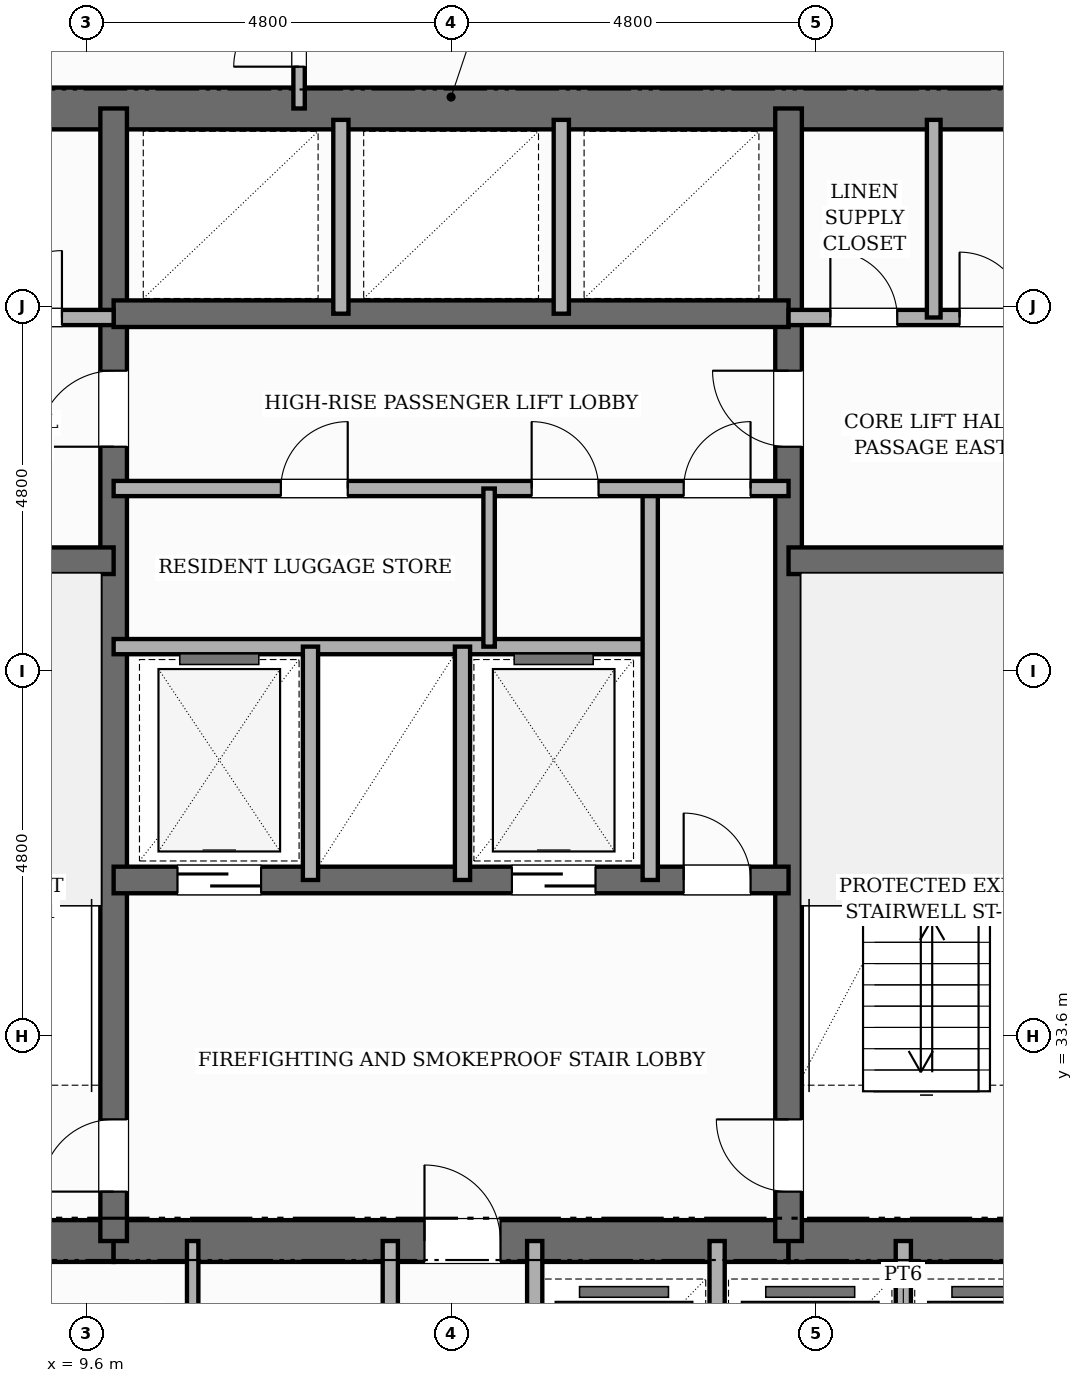
"""IFC4 building model, lengths in metres.
Left out: names, types, materials, properties, quantities, classifications, styles, units other than length and angle.
Written with IfcOpenShell. Run it as: python <this file> out.ifc"""

import sys

from ifc_helpers import new_model, si_unit, direction, frame, frame_2d, origin, place, context, subcontext, project, spatial, rectangle, extrude, element, fill, save


model = new_model("IFC4")
c1 = context("Model", 3, precision=1e-05, world=origin(), true_north=direction((0.0, 1.0)))
c2 = subcontext(c1, "Body", "Model", "MODEL_VIEW")
j1 = project(units=[si_unit("LENGTHUNIT", "METRE"), si_unit("PLANEANGLEUNIT", "RADIAN")], contexts=[c1])
p1 = place(None, origin())
s1 = spatial("IfcSite", under=j1, at=p1, CompositionType="ELEMENT")
p2 = place(p1, origin())
s2 = spatial("IfcBuilding", under=s1, at=p2, CompositionType="ELEMENT")
p3 = place(p2, frame((0.0, 0.0, 154.0)))
s3 = spatial("IfcBuildingStorey", under=s2, at=p3, CompositionType="ELEMENT", Elevation=154.0)
p4 = place(p3, frame((6.05, 45.8, 0.0), z_axis=(0.0, 0.0, 1.0), x_axis=(1.0, 0.0, 0.0)))
e1 = element("IfcWall", 1, at=p4, inside=s3, PredefinedType="SHEAR", context=c2, shape_type="SweptSolid", body=[
    extrude(rectangle(XDim=16.7, YDim=0.55, at=frame_2d((8.35, 0.0))), origin(), (0.0, 0.0, 1.0), 3.6),
])
p5 = place(p3, frame((6.05, 30.9, 0.0), z_axis=(0.0, 0.0, 1.0), x_axis=(1.0, 0.0, 0.0)))
e2 = element("IfcWall", 2, at=p5, inside=s3, PredefinedType="SHEAR", context=c2, shape_type="SweptSolid", body=[
    extrude(rectangle(XDim=3.91, YDim=0.55, at=frame_2d((1.955, 0.0))), origin(), (0.0, 0.0, 1.0), 3.6),
])
p6 = place(p3, frame((9.96, 30.9, 0.0), z_axis=(0.0, 0.0, 1.0), x_axis=(1.0, 0.0, 0.0)))
e3 = element("IfcWall", 3, at=p6, inside=s3, PredefinedType="SHEAR", context=c2, shape_type="SweptSolid", body=[
    extrude(rectangle(XDim=8.88, YDim=0.55, at=frame_2d((4.44, 0.0))), origin(), (0.0, 0.0, 1.0), 3.6),
])
p7 = place(p6, frame((4.09, 0.0, 0.0)))
e4 = element("IfcOpeningElement", 4, at=p7, cuts=e3, PredefinedType="OPENING", context=c2, shape_type="SweptSolid", body=[
    extrude(rectangle(XDim=1.0, YDim=2.15, at=frame_2d((0.5, 1.075))), frame((0.0, 0.285, 0.0), z_axis=(0.0, -1.0, 0.0), x_axis=(1.0, 0.0, 0.0)), (0.0, 0.0, 1.0), 0.57),
])
p8 = place(p3, frame((18.84, 30.9, 0.0), z_axis=(0.0, 0.0, 1.0), x_axis=(1.0, 0.0, 0.0)))
e5 = element("IfcWall", 5, at=p8, inside=s3, PredefinedType="SHEAR", context=c2, shape_type="SweptSolid", body=[
    extrude(rectangle(XDim=3.91, YDim=0.55, at=frame_2d((1.955, 0.0))), origin(), (0.0, 0.0, 1.0), 3.6),
])
p9 = place(p3, frame((9.96, 30.9, 0.0), z_axis=(0.0, 0.0, 1.0), x_axis=(0.0, 1.0, 0.0)))
e6 = element("IfcWall", 6, at=p9, inside=s3, PredefinedType="SHEAR", context=c2, shape_type="SweptSolid", body=[
    extrude(rectangle(XDim=14.9, YDim=0.35, at=frame_2d((7.45, 0.0))), origin(), (0.0, 0.0, 1.0), 3.6),
])
p10 = place(p9, frame((0.65, 0.0, 0.0)))
e7 = element("IfcOpeningElement", 7, at=p10, cuts=e6, PredefinedType="OPENING", context=c2, shape_type="SweptSolid", body=[
    extrude(rectangle(XDim=0.95, YDim=2.1, at=frame_2d((0.475, 1.05))), frame((0.0, 0.185, 0.0), z_axis=(0.0, -1.0, 0.0), x_axis=(1.0, 0.0, 0.0)), (0.0, 0.0, 1.0), 0.37),
])
p11 = place(p9, frame((10.45, 0.0, 0.0)))
e8 = element("IfcOpeningElement", 8, at=p11, cuts=e6, PredefinedType="OPENING", context=c2, shape_type="SweptSolid", body=[
    extrude(rectangle(XDim=1.0, YDim=2.15, at=frame_2d((0.5, 1.075))), frame((0.0, 0.185, 0.0), z_axis=(0.0, -1.0, 0.0), x_axis=(1.0, 0.0, 0.0)), (0.0, 0.0, 1.0), 0.37),
])
p12 = place(p3, frame((18.84, 30.9, 0.0), z_axis=(0.0, 0.0, 1.0), x_axis=(0.0, 1.0, 0.0)))
e9 = element("IfcWall", 9, at=p12, inside=s3, PredefinedType="SHEAR", context=c2, shape_type="SweptSolid", body=[
    extrude(rectangle(XDim=14.9, YDim=0.35, at=frame_2d((7.45, 0.0))), origin(), (0.0, 0.0, 1.0), 3.6),
])
p13 = place(p12, frame((0.65, 0.0, 0.0)))
e10 = element("IfcOpeningElement", 10, at=p13, cuts=e9, PredefinedType="OPENING", context=c2, shape_type="SweptSolid", body=[
    extrude(rectangle(XDim=0.95, YDim=2.1, at=frame_2d((0.475, 1.05))), frame((0.0, 0.185, 0.0), z_axis=(0.0, -1.0, 0.0), x_axis=(1.0, 0.0, 0.0)), (0.0, 0.0, 1.0), 0.37),
])
p14 = place(p12, frame((10.45, 0.0, 0.0)))
e11 = element("IfcOpeningElement", 11, at=p14, cuts=e9, PredefinedType="OPENING", context=c2, shape_type="SweptSolid", body=[
    extrude(rectangle(XDim=1.0, YDim=2.15, at=frame_2d((0.5, 1.075))), frame((0.0, 0.185, 0.0), z_axis=(0.0, -1.0, 0.0), x_axis=(1.0, 0.0, 0.0)), (0.0, 0.0, 1.0), 0.37),
])
for number, where, z_axis, x_axis in (
    (12, (6.05, 39.85, 0.0), (0.0, 0.0, 1.0), (1.0, 0.0, 0.0)),
    (13, (18.84, 39.85, 0.0), (0.0, 0.0, 1.0), (1.0, 0.0, 0.0)),
):
    element("IfcWall", number, at=place(p3, frame(where, z_axis=z_axis, x_axis=x_axis)), inside=s3, PredefinedType="SHEAR", context=c2, shape_type="SweptSolid", body=[
        extrude(rectangle(XDim=3.91, YDim=0.35, at=frame_2d((1.955, 0.0))), origin(), (0.0, 0.0, 1.0), 3.6),
    ])
p15 = place(p3, frame((9.96, 35.65, 0.0), z_axis=(0.0, 0.0, 1.0), x_axis=(1.0, 0.0, 0.0)))
e14 = element("IfcWall", 14, at=p15, inside=s3, PredefinedType="SHEAR", context=c2, shape_type="SweptSolid", body=[
    extrude(rectangle(XDim=8.88, YDim=0.35, at=frame_2d((4.44, 0.0))), origin(), (0.0, 0.0, 1.0), 3.6),
])
p16 = place(p15, frame((0.84, 0.0, 0.0)))
e15 = element("IfcOpeningElement", 15, at=p16, cuts=e14, PredefinedType="OPENING", context=c2, shape_type="SweptSolid", body=[
    extrude(rectangle(XDim=1.1, YDim=2.15, at=frame_2d((0.55, 1.075))), frame((0.0, 0.185, 0.0), z_axis=(0.0, -1.0, 0.0), x_axis=(1.0, 0.0, 0.0)), (0.0, 0.0, 1.0), 0.37),
])
p17 = place(p15, frame((5.24, 0.0, 0.0)))
e16 = element("IfcOpeningElement", 16, at=p17, cuts=e14, PredefinedType="OPENING", context=c2, shape_type="SweptSolid", body=[
    extrude(rectangle(XDim=1.1, YDim=2.15, at=frame_2d((0.55, 1.075))), frame((0.0, 0.185, 0.0), z_axis=(0.0, -1.0, 0.0), x_axis=(1.0, 0.0, 0.0)), (0.0, 0.0, 1.0), 0.37),
])
p18 = place(p15, frame((7.5, 0.0, 0.0)))
e17 = element("IfcOpeningElement", 17, at=p18, cuts=e14, PredefinedType="OPENING", context=c2, shape_type="SweptSolid", body=[
    extrude(rectangle(XDim=0.88, YDim=2.1, at=frame_2d((0.44, 1.05))), frame((0.0, 0.185, 0.0), z_axis=(0.0, -1.0, 0.0), x_axis=(1.0, 0.0, 0.0)), (0.0, 0.0, 1.0), 0.37),
])
p19 = place(p3, frame((9.96, 43.1, 0.0), z_axis=(0.0, 0.0, 1.0), x_axis=(1.0, 0.0, 0.0)))
e18 = element("IfcWall", 18, at=p19, inside=s3, PredefinedType="SHEAR", context=c2, shape_type="SweptSolid", body=[
    extrude(rectangle(XDim=8.88, YDim=0.35, at=frame_2d((4.44, 0.0))), origin(), (0.0, 0.0, 1.0), 3.6),
])
p20 = place(p3, frame((9.96, 38.72, 0.0), z_axis=(0.0, 0.0, 1.0), x_axis=(1.0, 0.0, 0.0)))
e19 = element("IfcWall", 19, at=p20, inside=s3, PredefinedType="POLYGONAL", context=c2, shape_type="SweptSolid", body=[
    extrude(rectangle(XDim=7.06, YDim=0.2, at=frame_2d((3.53, 0.0))), origin(), (0.0, 0.0, 1.0), 3.36),
])
for number, where, z_axis, x_axis in (
    (20, (12.55, 35.65, 0.0), (0.0, 0.0, 1.0), (0.0, 1.0, 0.0)),
    (21, (14.55, 35.65, 0.0), (0.0, 0.0, 1.0), (0.0, 1.0, 0.0)),
):
    element("IfcWall", number, at=place(p3, frame(where, z_axis=z_axis, x_axis=x_axis)), inside=s3, PredefinedType="POLYGONAL", context=c2, shape_type="SweptSolid", body=[
        extrude(rectangle(XDim=3.07, YDim=0.2, at=frame_2d((1.535, 0.0))), origin(), (0.0, 0.0, 1.0), 3.36),
    ])
p21 = place(p3, frame((17.02, 35.65, 0.0), z_axis=(0.0, 0.0, 1.0), x_axis=(0.0, 1.0, 0.0)))
e22 = element("IfcWall", 22, at=p21, inside=s3, PredefinedType="POLYGONAL", context=c2, shape_type="SweptSolid", body=[
    extrude(rectangle(XDim=5.15, YDim=0.2, at=frame_2d((2.575, 0.0))), origin(), (0.0, 0.0, 1.0), 3.36),
])
p22 = place(p3, frame((9.96, 40.8, 0.0), z_axis=(0.0, 0.0, 1.0), x_axis=(1.0, 0.0, 0.0)))
e23 = element("IfcWall", 23, at=p22, inside=s3, PredefinedType="POLYGONAL", context=c2, shape_type="SweptSolid", body=[
    extrude(rectangle(XDim=8.88, YDim=0.2, at=frame_2d((4.44, 0.0))), origin(), (0.0, 0.0, 1.0), 3.36),
])
p23 = place(p22, frame((7.5, 0.0, 0.0)))
e24 = element("IfcOpeningElement", 24, at=p23, cuts=e23, PredefinedType="OPENING", context=c2, shape_type="SweptSolid", body=[
    extrude(rectangle(XDim=0.88, YDim=2.1, at=frame_2d((0.44, 1.05))), frame((0.0, 0.11, 0.0), z_axis=(0.0, -1.0, 0.0), x_axis=(1.0, 0.0, 0.0)), (0.0, 0.0, 1.0), 0.22),
])
p24 = place(p22, frame((2.2, 0.0, 0.0)))
e25 = element("IfcOpeningElement", 25, at=p24, cuts=e23, PredefinedType="OPENING", context=c2, shape_type="SweptSolid", body=[
    extrude(rectangle(XDim=0.88, YDim=2.1, at=frame_2d((0.44, 1.05))), frame((0.0, 0.11, 0.0), z_axis=(0.0, -1.0, 0.0), x_axis=(1.0, 0.0, 0.0)), (0.0, 0.0, 1.0), 0.22),
])
p25 = place(p22, frame((5.5, 0.0, 0.0)))
e26 = element("IfcOpeningElement", 26, at=p25, cuts=e23, PredefinedType="OPENING", context=c2, shape_type="SweptSolid", body=[
    extrude(rectangle(XDim=0.88, YDim=2.1, at=frame_2d((0.44, 1.05))), frame((0.0, 0.11, 0.0), z_axis=(0.0, -1.0, 0.0), x_axis=(1.0, 0.0, 0.0)), (0.0, 0.0, 1.0), 0.22),
])
p26 = place(p3, frame((18.84, 43.05, 0.0), z_axis=(0.0, 0.0, 1.0), x_axis=(1.0, 0.0, 0.0)))
e27 = element("IfcWall", 27, at=p26, inside=s3, PredefinedType="POLYGONAL", context=c2, shape_type="SweptSolid", body=[
    extrude(rectangle(XDim=3.91, YDim=0.2, at=frame_2d((1.955, 0.0))), origin(), (0.0, 0.0, 1.0), 2.54),
])
p27 = place(p26, frame((0.55, 0.0, 0.0)))
e28 = element("IfcOpeningElement", 28, at=p27, cuts=e27, PredefinedType="OPENING", context=c2, shape_type="SweptSolid", body=[
    extrude(rectangle(XDim=0.88, YDim=2.1, at=frame_2d((0.44, 1.05))), frame((0.0, 0.11, 0.0), z_axis=(0.0, -1.0, 0.0), x_axis=(1.0, 0.0, 0.0)), (0.0, 0.0, 1.0), 0.22),
])
p28 = place(p26, frame((2.25, 0.0, 0.0)))
e29 = element("IfcOpeningElement", 29, at=p28, cuts=e27, PredefinedType="OPENING", context=c2, shape_type="SweptSolid", body=[
    extrude(rectangle(XDim=0.86, YDim=2.1, at=frame_2d((0.43, 1.05))), frame((0.0, 0.11, 0.0), z_axis=(0.0, -1.0, 0.0), x_axis=(1.0, 0.0, 0.0)), (0.0, 0.0, 1.0), 0.22),
])
p29 = place(p3, frame((6.05, 43.05, 0.0), z_axis=(0.0, 0.0, 1.0), x_axis=(1.0, 0.0, 0.0)))
e30 = element("IfcWall", 30, at=p29, inside=s3, PredefinedType="POLYGONAL", context=c2, shape_type="SweptSolid", body=[
    extrude(rectangle(XDim=3.91, YDim=0.2, at=frame_2d((1.955, 0.0))), origin(), (0.0, 0.0, 1.0), 2.54),
])
p30 = place(p29, frame((0.5, 0.0, 0.0)))
e31 = element("IfcOpeningElement", 31, at=p30, cuts=e30, PredefinedType="OPENING", context=c2, shape_type="SweptSolid", body=[
    extrude(rectangle(XDim=0.88, YDim=2.1, at=frame_2d((0.44, 1.05))), frame((0.0, 0.11, 0.0), z_axis=(0.0, -1.0, 0.0), x_axis=(1.0, 0.0, 0.0)), (0.0, 0.0, 1.0), 0.22),
])
p31 = place(p29, frame((2.35, 0.0, 0.0)))
e32 = element("IfcOpeningElement", 32, at=p31, cuts=e30, PredefinedType="OPENING", context=c2, shape_type="SweptSolid", body=[
    extrude(rectangle(XDim=0.88, YDim=2.1, at=frame_2d((0.44, 1.05))), frame((0.0, 0.11, 0.0), z_axis=(0.0, -1.0, 0.0), x_axis=(1.0, 0.0, 0.0)), (0.0, 0.0, 1.0), 0.22),
])
for number, where, z_axis, x_axis in (
    (33, (12.95, 43.1, 0.0), (0.0, 0.0, 1.0), (0.0, 1.0, 0.0)),
    (34, (15.85, 43.1, 0.0), (0.0, 0.0, 1.0), (0.0, 1.0, 0.0)),
):
    element("IfcWall", number, at=place(p3, frame(where, z_axis=z_axis, x_axis=x_axis)), inside=s3, PredefinedType="POLYGONAL", context=c2, shape_type="SweptSolid", body=[
        extrude(rectangle(XDim=2.55, YDim=0.2, at=frame_2d((1.275, 0.0))), origin(), (0.0, 0.0, 1.0), 3.36),
    ])
p32 = place(p3, frame((14.9, 38.72, 0.0), z_axis=(0.0, 0.0, 1.0), x_axis=(0.0, 1.0, 0.0)))
e35 = element("IfcWall", 35, at=p32, inside=s3, PredefinedType="PARTITIONING", context=c2, shape_type="SweptSolid", body=[
    extrude(rectangle(XDim=2.08, YDim=0.15, at=frame_2d((1.04, 0.0))), origin(), (0.0, 0.0, 1.0), 3.36),
])
p33 = place(p3, frame((20.75, 43.05, 0.0), z_axis=(0.0, 0.0, 1.0), x_axis=(0.0, 1.0, 0.0)))
e36 = element("IfcWall", 36, at=p33, inside=s3, PredefinedType="PLUMBINGWALL", context=c2, shape_type="SweptSolid", body=[
    extrude(rectangle(XDim=2.6, YDim=0.18, at=frame_2d((1.3, 0.0))), origin(), (0.0, 0.0, 1.0), 3.36),
])
p34 = place(p3, frame((13.6, 25.75, 0.0), z_axis=(0.0, 0.0, 1.0), x_axis=(0.0, 1.0, 0.0)))
e37 = element("IfcWall", 37, at=p34, inside=s3, PredefinedType="POLYGONAL", context=c2, shape_type="SweptSolid", body=[
    extrude(rectangle(XDim=5.15, YDim=0.2, at=frame_2d((2.575, 0.0))), origin(), (0.0, 0.0, 1.0), 3.36),
])
p35 = place(p34, frame((0.7, 0.0, 0.0)))
e38 = element("IfcOpeningElement", 38, at=p35, cuts=e37, PredefinedType="OPENING", context=c2, shape_type="SweptSolid", body=[
    extrude(rectangle(XDim=1.0, YDim=2.15, at=frame_2d((0.5, 1.075))), frame((0.0, 0.11, 0.0), z_axis=(0.0, -1.0, 0.0), x_axis=(1.0, 0.0, 0.0)), (0.0, 0.0, 1.0), 0.22),
])
p36 = place(p3, frame((11.0, 25.75, 0.0), z_axis=(0.0, 0.0, 1.0), x_axis=(0.0, 1.0, 0.0)))
e39 = element("IfcWall", 39, at=p36, inside=s3, PredefinedType="PARTITIONING", context=c2, shape_type="SweptSolid", body=[
    extrude(rectangle(XDim=5.15, YDim=0.15, at=frame_2d((2.575, 0.0))), origin(), (0.0, 0.0, 1.0), 3.36),
])
p37 = place(p36, frame((1.2, 0.0, 0.0)))
e40 = element("IfcOpeningElement", 40, at=p37, cuts=e39, PredefinedType="OPENING", context=c2, shape_type="SweptSolid", body=[
    extrude(rectangle(XDim=0.95, YDim=2.15, at=frame_2d((0.475, 1.075))), frame((0.0, 0.085, 0.0), z_axis=(0.0, -1.0, 0.0), x_axis=(1.0, 0.0, 0.0)), (0.0, 0.0, 1.0), 0.17),
])
for number, where, z_axis, x_axis in (
    (41, (15.5, 28.0, 0.0), (0.0, 0.0, 1.0), (0.0, 1.0, 0.0)),
    (42, (17.9, 28.0, 0.0), (0.0, 0.0, 1.0), (0.0, 1.0, 0.0)),
    (43, (20.35, 28.0, 0.0), (0.0, 0.0, 1.0), (0.0, 1.0, 0.0)),
):
    element("IfcWall", number, at=place(p3, frame(where, z_axis=z_axis, x_axis=x_axis)), inside=s3, PredefinedType="POLYGONAL", context=c2, shape_type="SweptSolid", body=[
        extrude(rectangle(XDim=2.9, YDim=0.2, at=frame_2d((1.45, 0.0))), origin(), (0.0, 0.0, 1.0), 3.36),
    ])
p38 = place(p3, frame((12.4, 45.8, 0.0), z_axis=(0.0, 0.0, 1.0), x_axis=(0.0, 1.0, 0.0)))
e44 = element("IfcWall", 44, at=p38, inside=s3, PredefinedType="PARTITIONING", context=c2, shape_type="SweptSolid", body=[
    extrude(rectangle(XDim=1.88, YDim=0.15, at=frame_2d((0.94, 0.0))), origin(), (0.0, 0.0, 1.0), 3.36),
])
p39 = place(p38, frame((0.55, 0.0, 0.0)))
e45 = element("IfcOpeningElement", 45, at=p39, cuts=e44, PredefinedType="OPENING", context=c2, shape_type="SweptSolid", body=[
    extrude(rectangle(XDim=0.86, YDim=2.1, at=frame_2d((0.43, 1.05))), frame((0.0, 0.085, 0.0), z_axis=(0.0, -1.0, 0.0), x_axis=(1.0, 0.0, 0.0)), (0.0, 0.0, 1.0), 0.17),
])
p40 = place(p10, origin())
e46 = element("IfcDoor", 46, at=p40, inside=s3, OperationType="SINGLE_SWING_LEFT", PredefinedType="DOOR", context=c2, shape_type="SweptSolid", body=[
    extrude(rectangle(XDim=0.95, YDim=2.1, at=frame_2d((0.475, 1.05))), frame((0.0, 0.025, 0.0), z_axis=(0.0, -1.0, 0.0), x_axis=(1.0, 0.0, 0.0)), (0.0, 0.0, 1.0), 0.05),
])
fill(e7, e46)
p41 = place(p13, origin())
e47 = element("IfcDoor", 47, at=p41, inside=s3, OperationType="SINGLE_SWING_RIGHT", PredefinedType="DOOR", context=c2, shape_type="SweptSolid", body=[
    extrude(rectangle(XDim=0.95, YDim=2.1, at=frame_2d((0.475, 1.05))), frame((0.0, 0.025, 0.0), z_axis=(0.0, -1.0, 0.0), x_axis=(1.0, 0.0, 0.0)), (0.0, 0.0, 1.0), 0.05),
])
fill(e10, e47)
p42 = place(p7, origin())
e48 = element("IfcDoor", 48, at=p42, inside=s3, OperationType="SINGLE_SWING_LEFT", PredefinedType="DOOR", context=c2, shape_type="SweptSolid", body=[
    extrude(rectangle(XDim=1.0, YDim=2.15, at=frame_2d((0.5, 1.075))), frame((0.0, 0.025, 0.0), z_axis=(0.0, -1.0, 0.0), x_axis=(1.0, 0.0, 0.0)), (0.0, 0.0, 1.0), 0.05),
])
fill(e4, e48)
p43 = place(p16, origin())
e49 = element("IfcDoor", 49, at=p43, inside=s3, OperationType="SLIDING_TO_LEFT", PredefinedType="DOOR", context=c2, shape_type="SweptSolid", body=[
    extrude(rectangle(XDim=1.1, YDim=2.15, at=frame_2d((0.55, 1.075))), frame((0.0, 0.025, 0.0), z_axis=(0.0, -1.0, 0.0), x_axis=(1.0, 0.0, 0.0)), (0.0, 0.0, 1.0), 0.05),
])
fill(e15, e49)
p44 = place(p17, origin())
e50 = element("IfcDoor", 50, at=p44, inside=s3, OperationType="SLIDING_TO_RIGHT", PredefinedType="DOOR", context=c2, shape_type="SweptSolid", body=[
    extrude(rectangle(XDim=1.1, YDim=2.15, at=frame_2d((0.55, 1.075))), frame((0.0, 0.025, 0.0), z_axis=(0.0, -1.0, 0.0), x_axis=(1.0, 0.0, 0.0)), (0.0, 0.0, 1.0), 0.05),
])
fill(e16, e50)
p45 = place(p18, origin())
e51 = element("IfcDoor", 51, at=p45, inside=s3, OperationType="SINGLE_SWING_LEFT", PredefinedType="DOOR", context=c2, shape_type="SweptSolid", body=[
    extrude(rectangle(XDim=0.88, YDim=2.1, at=frame_2d((0.44, 1.05))), frame((0.0, 0.025, 0.0), z_axis=(0.0, -1.0, 0.0), x_axis=(1.0, 0.0, 0.0)), (0.0, 0.0, 1.0), 0.05),
])
fill(e17, e51)
p46 = place(p23, origin())
e52 = element("IfcDoor", 52, at=p46, inside=s3, OperationType="SINGLE_SWING_RIGHT", PredefinedType="DOOR", context=c2, shape_type="SweptSolid", body=[
    extrude(rectangle(XDim=0.88, YDim=2.1, at=frame_2d((0.44, 1.05))), frame((0.0, 0.025, 0.0), z_axis=(0.0, -1.0, 0.0), x_axis=(1.0, 0.0, 0.0)), (0.0, 0.0, 1.0), 0.05),
])
fill(e24, e52)
p47 = place(p11, origin())
e53 = element("IfcDoor", 53, at=p47, inside=s3, OperationType="SINGLE_SWING_LEFT", PredefinedType="DOOR", context=c2, shape_type="SweptSolid", body=[
    extrude(rectangle(XDim=1.0, YDim=2.15, at=frame_2d((0.5, 1.075))), frame((0.0, 0.025, 0.0), z_axis=(0.0, -1.0, 0.0), x_axis=(1.0, 0.0, 0.0)), (0.0, 0.0, 1.0), 0.05),
])
fill(e8, e53)
p48 = place(p14, origin())
e54 = element("IfcDoor", 54, at=p48, inside=s3, OperationType="SINGLE_SWING_RIGHT", PredefinedType="DOOR", context=c2, shape_type="SweptSolid", body=[
    extrude(rectangle(XDim=1.0, YDim=2.15, at=frame_2d((0.5, 1.075))), frame((0.0, 0.025, 0.0), z_axis=(0.0, -1.0, 0.0), x_axis=(1.0, 0.0, 0.0)), (0.0, 0.0, 1.0), 0.05),
])
fill(e11, e54)
p49 = place(p31, origin())
e55 = element("IfcDoor", 55, at=p49, inside=s3, OperationType="SINGLE_SWING_RIGHT", PredefinedType="DOOR", context=c2, shape_type="SweptSolid", body=[
    extrude(rectangle(XDim=0.88, YDim=2.1, at=frame_2d((0.44, 1.05))), frame((0.0, 0.025, 0.0), z_axis=(0.0, -1.0, 0.0), x_axis=(1.0, 0.0, 0.0)), (0.0, 0.0, 1.0), 0.05),
])
fill(e32, e55)
p50 = place(p24, origin())
e56 = element("IfcDoor", 56, at=p50, inside=s3, OperationType="SINGLE_SWING_RIGHT", PredefinedType="DOOR", context=c2, shape_type="SweptSolid", body=[
    extrude(rectangle(XDim=0.88, YDim=2.1, at=frame_2d((0.44, 1.05))), frame((0.0, 0.025, 0.0), z_axis=(0.0, -1.0, 0.0), x_axis=(1.0, 0.0, 0.0)), (0.0, 0.0, 1.0), 0.05),
])
fill(e25, e56)
p51 = place(p25, origin())
e57 = element("IfcDoor", 57, at=p51, inside=s3, OperationType="SINGLE_SWING_LEFT", PredefinedType="DOOR", context=c2, shape_type="SweptSolid", body=[
    extrude(rectangle(XDim=0.88, YDim=2.1, at=frame_2d((0.44, 1.05))), frame((0.0, 0.025, 0.0), z_axis=(0.0, -1.0, 0.0), x_axis=(1.0, 0.0, 0.0)), (0.0, 0.0, 1.0), 0.05),
])
fill(e26, e57)
p52 = place(p27, origin())
e58 = element("IfcDoor", 58, at=p52, inside=s3, OperationType="SINGLE_SWING_LEFT", PredefinedType="DOOR", context=c2, shape_type="SweptSolid", body=[
    extrude(rectangle(XDim=0.88, YDim=2.1, at=frame_2d((0.44, 1.05))), frame((0.0, 0.025, 0.0), z_axis=(0.0, -1.0, 0.0), x_axis=(1.0, 0.0, 0.0)), (0.0, 0.0, 1.0), 0.05),
])
fill(e28, e58)
p53 = place(p28, origin())
e59 = element("IfcDoor", 59, at=p53, inside=s3, OperationType="SINGLE_SWING_LEFT", PredefinedType="DOOR", context=c2, shape_type="SweptSolid", body=[
    extrude(rectangle(XDim=0.86, YDim=2.1, at=frame_2d((0.43, 1.05))), frame((0.0, 0.025, 0.0), z_axis=(0.0, -1.0, 0.0), x_axis=(1.0, 0.0, 0.0)), (0.0, 0.0, 1.0), 0.05),
])
fill(e29, e59)
p54 = place(p39, origin())
e60 = element("IfcDoor", 60, at=p54, inside=s3, OperationType="SINGLE_SWING_LEFT", PredefinedType="DOOR", context=c2, shape_type="SweptSolid", body=[
    extrude(rectangle(XDim=0.86, YDim=2.1, at=frame_2d((0.43, 1.05))), frame((0.0, 0.025, 0.0), z_axis=(0.0, -1.0, 0.0), x_axis=(1.0, 0.0, 0.0)), (0.0, 0.0, 1.0), 0.05),
])
fill(e45, e60)
save(model, sys.argv[1])
